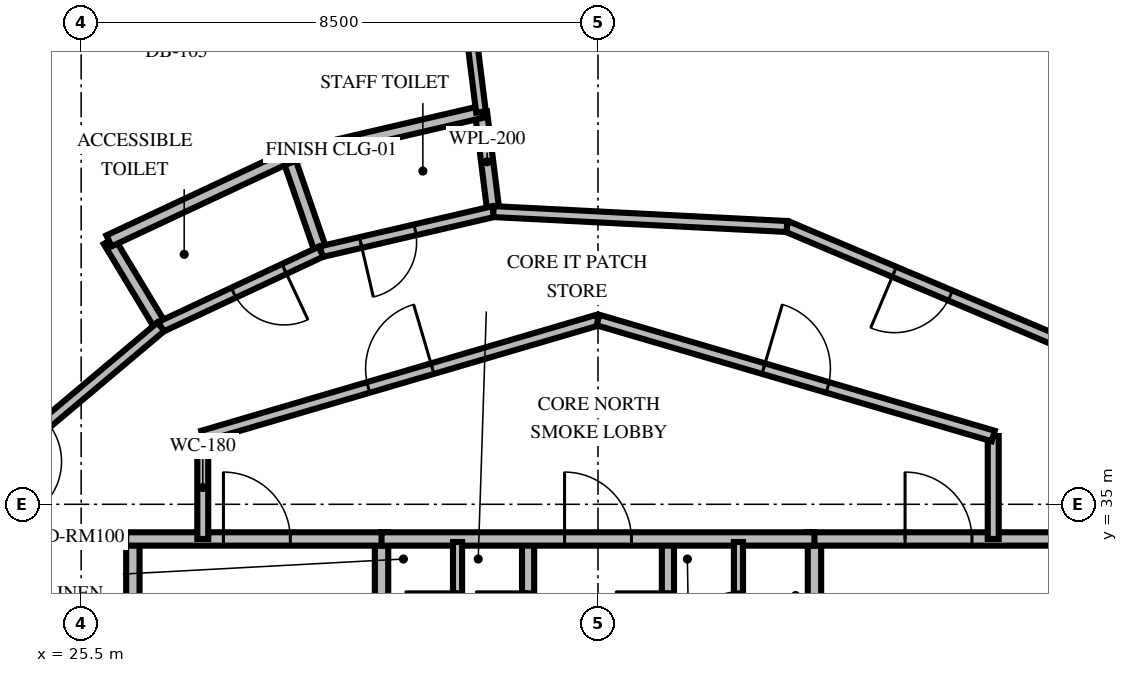
"""IFC4 building model, lengths in metres.
Left out: names, types, materials, properties, quantities, classifications, styles, units other than length and angle.
Written with IfcOpenShell. Run it as: python <this file> out.ifc"""

import sys

from ifc_helpers import new_model, si_unit, direction, frame, frame_2d, origin, place, context, subcontext, project, spatial, rectangle, extrude, element, fill, save


model = new_model("IFC4")
c1 = context("Model", 3, precision=1e-05, world=origin(), true_north=direction((0.0, 1.0)))
c2 = subcontext(c1, "Body", "Model", "MODEL_VIEW")
j1 = project(units=[si_unit("LENGTHUNIT", "METRE"), si_unit("PLANEANGLEUNIT", "RADIAN")], contexts=[c1])
p1 = place(None, origin())
s1 = spatial("IfcSite", under=j1, at=p1, CompositionType="ELEMENT")
p2 = place(p1, origin())
s2 = spatial("IfcBuilding", under=s1, at=p2, CompositionType="ELEMENT")
p3 = place(p2, frame((0.0, 0.0, 105.8)))
s3 = spatial("IfcBuildingStorey", under=s2, at=p3, CompositionType="ELEMENT", Elevation=105.8)
p4 = place(p3, frame((26.35, 30.05, 0.0), z_axis=(0.0, 0.0, 1.0), x_axis=(0.0, 1.0, 0.0)))
e1 = element("IfcWall", 1, at=p4, inside=s3, PredefinedType="SOLIDWALL", context=c2, shape_type="SweptSolid", body=[
    extrude(rectangle(XDim=4.38, YDim=0.22, at=frame_2d((2.19, 0.0))), origin(), (0.0, 0.0, 1.0), 2.8),
])
p5 = place(p3, frame((30.44, 30.05, 0.0), z_axis=(0.0, 0.0, 1.0), x_axis=(0.0, 1.0, 0.0)))
e2 = element("IfcWall", 2, at=p5, inside=s3, PredefinedType="SOLIDWALL", context=c2, shape_type="SweptSolid", body=[
    extrude(rectangle(XDim=4.38, YDim=0.22, at=frame_2d((2.19, 0.0))), origin(), (0.0, 0.0, 1.0), 2.8),
])
p6 = place(p5, frame((0.8, 0.0, 0.0)))
e3 = element("IfcOpeningElement", 3, at=p6, cuts=e2, PredefinedType="OPENING", context=c2, shape_type="SweptSolid", body=[
    extrude(rectangle(XDim=1.05, YDim=2.1, at=frame_2d((0.525, 1.05))), frame((0.0, 0.12, 0.0), z_axis=(0.0, -1.0, 0.0), x_axis=(1.0, 0.0, 0.0)), (0.0, 0.0, 1.0), 0.24),
])
p7 = place(p3, frame((26.24, 34.43, 0.0), z_axis=(0.0, 0.0, 1.0), x_axis=(1.0, 0.0, 0.0)))
e4 = element("IfcWall", 4, at=p7, inside=s3, PredefinedType="SOLIDWALL", context=c2, shape_type="SweptSolid", body=[
    extrude(rectangle(XDim=4.31, YDim=0.22, at=frame_2d((2.155, 0.0))), origin(), (0.0, 0.0, 1.0), 2.8),
])
p8 = place(p7, frame((1.6, 0.0, 0.0)))
e5 = element("IfcOpeningElement", 5, at=p8, cuts=e4, PredefinedType="OPENING", context=c2, shape_type="SweptSolid", body=[
    extrude(rectangle(XDim=1.1, YDim=2.15, at=frame_2d((0.55, 1.075))), frame((0.0, 0.12, 0.0), z_axis=(0.0, -1.0, 0.0), x_axis=(1.0, 0.0, 0.0)), (0.0, 0.0, 1.0), 0.24),
])
p9 = place(p3, frame((32.85, 30.05, 0.0), z_axis=(0.0, 0.0, 1.0), x_axis=(0.0, 1.0, 0.0)))
e6 = element("IfcWall", 6, at=p9, inside=s3, PredefinedType="SOLIDWALL", context=c2, shape_type="SweptSolid", body=[
    extrude(rectangle(XDim=4.38, YDim=0.2, at=frame_2d((2.19, 0.0))), origin(), (0.0, 0.0, 1.0), 2.8),
])
p10 = place(p9, frame((2.65, 0.0, 0.0)))
e7 = element("IfcOpeningElement", 7, at=p10, cuts=e6, PredefinedType="OPENING", context=c2, shape_type="SweptSolid", body=[
    extrude(rectangle(XDim=0.86, YDim=2.05, at=frame_2d((0.43, 1.025))), frame((0.0, 0.11, 0.0), z_axis=(0.0, -1.0, 0.0), x_axis=(1.0, 0.0, 0.0)), (0.0, 0.0, 1.0), 0.22),
])
p11 = place(p3, frame((37.56, 30.05, 0.0), z_axis=(0.0, 0.0, 1.0), x_axis=(0.0, 1.0, 0.0)))
e8 = element("IfcWall", 8, at=p11, inside=s3, PredefinedType="SOLIDWALL", context=c2, shape_type="SweptSolid", body=[
    extrude(rectangle(XDim=4.38, YDim=0.22, at=frame_2d((2.19, 0.0))), origin(), (0.0, 0.0, 1.0), 2.8),
])
p12 = place(p11, frame((0.8, 0.0, 0.0)))
e9 = element("IfcOpeningElement", 9, at=p12, cuts=e8, PredefinedType="OPENING", context=c2, shape_type="SweptSolid", body=[
    extrude(rectangle(XDim=1.05, YDim=2.1, at=frame_2d((0.525, 1.05))), frame((0.0, 0.12, 0.0), z_axis=(0.0, -1.0, 0.0), x_axis=(1.0, 0.0, 0.0)), (0.0, 0.0, 1.0), 0.24),
])
p13 = place(p3, frame((37.45, 34.43, 0.0), z_axis=(0.0, 0.0, 1.0), x_axis=(1.0, 0.0, 0.0)))
e10 = element("IfcWall", 10, at=p13, inside=s3, PredefinedType="SOLIDWALL", context=c2, shape_type="SweptSolid", body=[
    extrude(rectangle(XDim=4.31, YDim=0.22, at=frame_2d((2.155, 0.0))), origin(), (0.0, 0.0, 1.0), 2.8),
])
p14 = place(p13, frame((1.6, 0.0, 0.0)))
e11 = element("IfcOpeningElement", 11, at=p14, cuts=e10, PredefinedType="OPENING", context=c2, shape_type="SweptSolid", body=[
    extrude(rectangle(XDim=1.1, YDim=2.15, at=frame_2d((0.55, 1.075))), frame((0.0, 0.12, 0.0), z_axis=(0.0, -1.0, 0.0), x_axis=(1.0, 0.0, 0.0)), (0.0, 0.0, 1.0), 0.24),
])
p15 = place(p3, frame((35.15, 30.05, 0.0), z_axis=(0.0, 0.0, 1.0), x_axis=(0.0, 1.0, 0.0)))
e12 = element("IfcWall", 12, at=p15, inside=s3, PredefinedType="SOLIDWALL", context=c2, shape_type="SweptSolid", body=[
    extrude(rectangle(XDim=4.38, YDim=0.2, at=frame_2d((2.19, 0.0))), origin(), (0.0, 0.0, 1.0), 2.8),
])
p16 = place(p15, frame((2.65, 0.0, 0.0)))
e13 = element("IfcOpeningElement", 13, at=p16, cuts=e12, PredefinedType="OPENING", context=c2, shape_type="SweptSolid", body=[
    extrude(rectangle(XDim=0.86, YDim=2.05, at=frame_2d((0.43, 1.025))), frame((0.0, 0.11, 0.0), z_axis=(0.0, -1.0, 0.0), x_axis=(1.0, 0.0, 0.0)), (0.0, 0.0, 1.0), 0.22),
])
p17 = place(p3, frame((30.44, 34.43, 0.0), z_axis=(0.0, 0.0, 1.0), x_axis=(1.0, 0.0, 0.0)))
e14 = element("IfcWall", 14, at=p17, inside=s3, PredefinedType="SOLIDWALL", context=c2, shape_type="SweptSolid", body=[
    extrude(rectangle(XDim=7.12, YDim=0.22, at=frame_2d((3.56, 0.0))), origin(), (0.0, 0.0, 1.0), 2.8),
])
p18 = place(p17, frame((3.01, 0.0, 0.0)))
e15 = element("IfcOpeningElement", 15, at=p18, cuts=e14, PredefinedType="OPENING", context=c2, shape_type="SweptSolid", body=[
    extrude(rectangle(XDim=1.1, YDim=2.15, at=frame_2d((0.55, 1.075))), frame((0.0, 0.12, 0.0), z_axis=(0.0, -1.0, 0.0), x_axis=(1.0, 0.0, 0.0)), (0.0, 0.0, 1.0), 0.24),
])
p19 = place(p3, frame((31.69, 32.05, 0.0), z_axis=(0.0, 0.0, 1.0), x_axis=(0.0, 1.0, 0.0)))
e16 = element("IfcWall", 16, at=p19, inside=s3, PredefinedType="PARTITIONING", context=c2, shape_type="SweptSolid", body=[
    extrude(rectangle(XDim=2.33, YDim=0.15, at=frame_2d((1.165, 0.0))), origin(), (0.0, 0.0, 1.0), 2.8),
])
p20 = place(p19, frame((0.65, 0.0, 0.0)))
e17 = element("IfcOpeningElement", 17, at=p20, cuts=e16, PredefinedType="OPENING", context=c2, shape_type="SweptSolid", body=[
    extrude(rectangle(XDim=0.86, YDim=2.05, at=frame_2d((0.43, 1.025))), frame((0.0, 0.085, 0.0), z_axis=(0.0, -1.0, 0.0), x_axis=(1.0, 0.0, 0.0)), (0.0, 0.0, 1.0), 0.17),
])
p21 = place(p3, frame((36.31, 32.05, 0.0), z_axis=(0.0, 0.0, 1.0), x_axis=(0.0, 1.0, 0.0)))
e18 = element("IfcWall", 18, at=p21, inside=s3, PredefinedType="PARTITIONING", context=c2, shape_type="SweptSolid", body=[
    extrude(rectangle(XDim=2.33, YDim=0.15, at=frame_2d((1.165, 0.0))), origin(), (0.0, 0.0, 1.0), 2.8),
])
p22 = place(p21, frame((0.65, 0.0, 0.0)))
e19 = element("IfcOpeningElement", 19, at=p22, cuts=e18, PredefinedType="OPENING", context=c2, shape_type="SweptSolid", body=[
    extrude(rectangle(XDim=0.86, YDim=2.05, at=frame_2d((0.43, 1.025))), frame((0.0, 0.085, 0.0), z_axis=(0.0, -1.0, 0.0), x_axis=(1.0, 0.0, 0.0)), (0.0, 0.0, 1.0), 0.17),
])
for number, where, z_axis, x_axis in (
    (20, (27.5, 34.43, 0.0), (0.0, 0.0, 1.0), (0.0, 1.0, 0.0)),
    (21, (40.5, 36.123, 0.0), (0.0, 0.0, 1.0), (0.0, -1.0, 0.0)),
):
    element("IfcWall", number, at=place(p3, frame(where, z_axis=z_axis, x_axis=x_axis)), inside=s3, PredefinedType="PARTITIONING", context=c2, shape_type="SweptSolid", body=[
        extrude(rectangle(XDim=1.693, YDim=0.18, at=frame_2d((0.846, 0.0))), origin(), (0.0, 0.0, 1.0), 2.8),
    ])
p23 = place(p3, frame((27.5, 36.123, 0.0), z_axis=(0.0, 0.0, 1.0), x_axis=(0.959546654541, 0.281549671923, 0.0)))
e22 = element("IfcWall", 22, at=p23, inside=s3, PredefinedType="PARTITIONING", context=c2, shape_type="SweptSolid", body=[
    extrude(rectangle(XDim=6.774, YDim=0.18, at=frame_2d((3.387, 0.0))), origin(), (0.0, 0.0, 1.0), 2.8),
])
p24 = place(p23, frame((2.837, 0.0, 0.0)))
e23 = element("IfcOpeningElement", 23, at=p24, cuts=e22, PredefinedType="OPENING", context=c2, shape_type="SweptSolid", body=[
    extrude(rectangle(XDim=1.1, YDim=2.15, at=frame_2d((0.55, 1.075))), frame((0.0, 0.1, 0.0), z_axis=(0.0, -1.0, 0.0), x_axis=(1.0, 0.0, 0.0)), (0.0, 0.0, 1.0), 0.2),
])
p25 = place(p3, frame((34.0, 38.03, 0.0), z_axis=(0.0, 0.0, 1.0), x_axis=(0.959546654541, -0.281549671923, 0.0)))
e24 = element("IfcWall", 24, at=p25, inside=s3, PredefinedType="PARTITIONING", context=c2, shape_type="SweptSolid", body=[
    extrude(rectangle(XDim=6.774, YDim=0.18, at=frame_2d((3.387, 0.0))), origin(), (0.0, 0.0, 1.0), 2.8),
])
p26 = place(p25, frame((2.837, 0.0, 0.0)))
e25 = element("IfcOpeningElement", 25, at=p26, cuts=e24, PredefinedType="OPENING", context=c2, shape_type="SweptSolid", body=[
    extrude(rectangle(XDim=1.1, YDim=2.15, at=frame_2d((0.55, 1.075))), frame((0.0, 0.1, 0.0), z_axis=(0.0, -1.0, 0.0), x_axis=(1.0, 0.0, 0.0)), (0.0, 0.0, 1.0), 0.2),
])
p27 = place(p3, frame((32.28, 39.813, 0.0), z_axis=(0.0, 0.0, 1.0), x_axis=(-0.123688744547, 0.992321064209, 0.0)))
e26 = element("IfcWall", 26, at=p27, inside=s3, PredefinedType="PLUMBINGWALL", context=c2, shape_type="SweptSolid", body=[
    extrude(rectangle(XDim=1.65, YDim=0.2, at=frame_2d((0.825, 0.0))), origin(), (0.0, 0.0, 1.0), 2.8),
])
p28 = place(p3, frame((29.445, 39.154, 0.0), z_axis=(0.0, 0.0, 1.0), x_axis=(-0.327171551358, 0.944964960187, 0.0)))
e27 = element("IfcWall", 27, at=p28, inside=s3, PredefinedType="PLUMBINGWALL", context=c2, shape_type="SweptSolid", body=[
    extrude(rectangle(XDim=1.65, YDim=0.2, at=frame_2d((0.825, 0.0))), origin(), (0.0, 0.0, 1.0), 2.8),
])
p29 = place(p3, frame((32.075, 41.451, 0.0), z_axis=(0.0, 0.0, 1.0), x_axis=(-0.973971068417, -0.22667235801, 0.0)))
e28 = element("IfcWall", 28, at=p29, inside=s3, PredefinedType="PLUMBINGWALL", context=c2, shape_type="SweptSolid", body=[
    extrude(rectangle(XDim=3.255, YDim=0.2, at=frame_2d((1.627, 0.0))), origin(), (0.0, 0.0, 1.0), 2.8),
])
p30 = place(p3, frame((32.28, 39.813, 0.0), z_axis=(0.0, 0.0, 1.0), x_axis=(-0.97398951497, -0.22659308182, 0.0)))
e29 = element("IfcWall", 29, at=p30, inside=s3, PredefinedType="PARTITIONING", context=c2, shape_type="SweptSolid", body=[
    extrude(rectangle(XDim=2.91, YDim=0.18, at=frame_2d((1.455, 0.0))), origin(), (0.0, 0.0, 1.0), 2.8),
])
p31 = place(p30, frame((1.321, 0.0, 0.0)))
e30 = element("IfcOpeningElement", 30, at=p31, cuts=e29, PredefinedType="OPENING", context=c2, shape_type="SweptSolid", body=[
    extrude(rectangle(XDim=0.92, YDim=2.1, at=frame_2d((0.46, 1.05))), frame((0.0, 0.1, 0.0), z_axis=(0.0, -1.0, 0.0), x_axis=(1.0, 0.0, 0.0)), (0.0, 0.0, 1.0), 0.2),
])
p32 = place(p3, frame((26.81, 37.919, 0.0), z_axis=(0.0, 0.0, 1.0), x_axis=(-0.516539665959, 0.85626326179, 0.0)))
e31 = element("IfcWall", 31, at=p32, inside=s3, PredefinedType="PLUMBINGWALL", context=c2, shape_type="SweptSolid", body=[
    extrude(rectangle(XDim=1.65, YDim=0.2, at=frame_2d((0.825, 0.0))), origin(), (0.0, 0.0, 1.0), 2.8),
])
p33 = place(p3, frame((28.905, 40.713, 0.0), z_axis=(0.0, 0.0, 1.0), x_axis=(-0.905565194379, -0.424207117725, 0.0)))
e32 = element("IfcWall", 32, at=p33, inside=s3, PredefinedType="PLUMBINGWALL", context=c2, shape_type="SweptSolid", body=[
    extrude(rectangle(XDim=3.255, YDim=0.2, at=frame_2d((1.627, 0.0))), origin(), (0.0, 0.0, 1.0), 2.8),
])
p34 = place(p3, frame((29.445, 39.154, 0.0), z_axis=(0.0, 0.0, 1.0), x_axis=(-0.905545564417, -0.424249019757, 0.0)))
e33 = element("IfcWall", 33, at=p34, inside=s3, PredefinedType="PARTITIONING", context=c2, shape_type="SweptSolid", body=[
    extrude(rectangle(XDim=2.91, YDim=0.18, at=frame_2d((1.455, 0.0))), origin(), (0.0, 0.0, 1.0), 2.8),
])
p35 = place(p34, frame((0.669, 0.0, 0.0)))
e34 = element("IfcOpeningElement", 34, at=p35, cuts=e33, PredefinedType="OPENING", context=c2, shape_type="SweptSolid", body=[
    extrude(rectangle(XDim=0.92, YDim=2.1, at=frame_2d((0.46, 1.05))), frame((0.0, 0.1, 0.0), z_axis=(0.0, -1.0, 0.0), x_axis=(1.0, 0.0, 0.0)), (0.0, 0.0, 1.0), 0.2),
])
p36 = place(p3, frame((32.075, 41.451, 0.0), z_axis=(0.0, 0.0, 1.0), x_axis=(-0.123557239278, 0.992337446951, 0.0)))
e35 = element("IfcWall", 35, at=p36, inside=s3, PredefinedType="PARTITIONING", context=c2, shape_type="SweptSolid", body=[
    extrude(rectangle(XDim=4.153, YDim=0.16, at=frame_2d((2.077, 0.0))), origin(), (0.0, 0.0, 1.0), 2.8),
])
p37 = place(p3, frame((26.81, 37.919, 0.0), z_axis=(0.0, 0.0, 1.0), x_axis=(-0.764925735115, -0.644118482702, 0.0)))
e36 = element("IfcWall", 36, at=p37, inside=s3, PredefinedType="PARTITIONING", context=c2, shape_type="SweptSolid", body=[
    extrude(rectangle(XDim=4.355, YDim=0.18, at=frame_2d((2.177, 0.0))), origin(), (0.0, 0.0, 1.0), 2.8),
])
p38 = place(p37, frame((2.441, 0.0, 0.0)))
e37 = element("IfcOpeningElement", 37, at=p38, cuts=e36, PredefinedType="OPENING", context=c2, shape_type="SweptSolid", body=[
    extrude(rectangle(XDim=1.0, YDim=2.15, at=frame_2d((0.5, 1.075))), frame((0.0, 0.1, 0.0), z_axis=(0.0, -1.0, 0.0), x_axis=(1.0, 0.0, 0.0)), (0.0, 0.0, 1.0), 0.2),
])
p39 = place(p3, frame((41.561, 37.688, 0.0), z_axis=(0.0, 0.0, 1.0), x_axis=(-0.92119083755, 0.389111090583, 0.0)))
e38 = element("IfcWall", 38, at=p39, inside=s3, PredefinedType="PARTITIONING", context=c2, shape_type="SweptSolid", body=[
    extrude(rectangle(XDim=4.834, YDim=0.18, at=frame_2d((2.417, 0.0))), origin(), (0.0, 0.0, 1.0), 2.8),
])
p40 = place(p39, frame((1.917, 0.0, 0.0)))
e39 = element("IfcOpeningElement", 39, at=p40, cuts=e38, PredefinedType="OPENING", context=c2, shape_type="SweptSolid", body=[
    extrude(rectangle(XDim=1.0, YDim=2.15, at=frame_2d((0.5, 1.075))), frame((0.0, 0.1, 0.0), z_axis=(0.0, -1.0, 0.0), x_axis=(1.0, 0.0, 0.0)), (0.0, 0.0, 1.0), 0.2),
])
p41 = place(p3, frame((37.108, 39.569, 0.0), z_axis=(0.0, 0.0, 1.0), x_axis=(-0.998718869606, 0.050602564085, 0.0)))
e40 = element("IfcWall", 40, at=p41, inside=s3, PredefinedType="PARTITIONING", context=c2, shape_type="SweptSolid", body=[
    extrude(rectangle(XDim=4.834, YDim=0.18, at=frame_2d((2.417, 0.0))), origin(), (0.0, 0.0, 1.0), 2.8),
])
p42 = place(p8, origin())
e41 = element("IfcDoor", 41, at=p42, inside=s3, OperationType="SINGLE_SWING_LEFT", PredefinedType="DOOR", context=c2, shape_type="SweptSolid", body=[
    extrude(rectangle(XDim=1.1, YDim=2.15, at=frame_2d((0.55, 1.075))), frame((0.0, 0.025, 0.0), z_axis=(0.0, -1.0, 0.0), x_axis=(1.0, 0.0, 0.0)), (0.0, 0.0, 1.0), 0.05),
])
fill(e5, e41)
p43 = place(p10, origin())
e42 = element("IfcDoor", 42, at=p43, inside=s3, OperationType="SINGLE_SWING_RIGHT", PredefinedType="TRAPDOOR", context=c2, shape_type="SweptSolid", body=[
    extrude(rectangle(XDim=0.86, YDim=2.05, at=frame_2d((0.43, 1.025))), frame((0.0, 0.025, 0.0), z_axis=(0.0, -1.0, 0.0), x_axis=(1.0, 0.0, 0.0)), (0.0, 0.0, 1.0), 0.05),
])
fill(e7, e42)
p44 = place(p14, origin())
e43 = element("IfcDoor", 43, at=p44, inside=s3, OperationType="SINGLE_SWING_LEFT", PredefinedType="DOOR", context=c2, shape_type="SweptSolid", body=[
    extrude(rectangle(XDim=1.1, YDim=2.15, at=frame_2d((0.55, 1.075))), frame((0.0, 0.025, 0.0), z_axis=(0.0, -1.0, 0.0), x_axis=(1.0, 0.0, 0.0)), (0.0, 0.0, 1.0), 0.05),
])
fill(e11, e43)
p45 = place(p16, origin())
e44 = element("IfcDoor", 44, at=p45, inside=s3, OperationType="SINGLE_SWING_RIGHT", PredefinedType="TRAPDOOR", context=c2, shape_type="SweptSolid", body=[
    extrude(rectangle(XDim=0.86, YDim=2.05, at=frame_2d((0.43, 1.025))), frame((0.0, 0.025, 0.0), z_axis=(0.0, -1.0, 0.0), x_axis=(1.0, 0.0, 0.0)), (0.0, 0.0, 1.0), 0.05),
])
fill(e13, e44)
p46 = place(p18, origin())
e45 = element("IfcDoor", 45, at=p46, inside=s3, OperationType="SINGLE_SWING_LEFT", PredefinedType="DOOR", context=c2, shape_type="SweptSolid", body=[
    extrude(rectangle(XDim=1.1, YDim=2.15, at=frame_2d((0.55, 1.075))), frame((0.0, 0.025, 0.0), z_axis=(0.0, -1.0, 0.0), x_axis=(1.0, 0.0, 0.0)), (0.0, 0.0, 1.0), 0.05),
])
fill(e15, e45)
p47 = place(p20, origin())
e46 = element("IfcDoor", 46, at=p47, inside=s3, OperationType="SINGLE_SWING_RIGHT", PredefinedType="TRAPDOOR", context=c2, shape_type="SweptSolid", body=[
    extrude(rectangle(XDim=0.86, YDim=2.05, at=frame_2d((0.43, 1.025))), frame((0.0, 0.025, 0.0), z_axis=(0.0, -1.0, 0.0), x_axis=(1.0, 0.0, 0.0)), (0.0, 0.0, 1.0), 0.05),
])
fill(e17, e46)
p48 = place(p22, origin())
e47 = element("IfcDoor", 47, at=p48, inside=s3, OperationType="SINGLE_SWING_LEFT", PredefinedType="TRAPDOOR", context=c2, shape_type="SweptSolid", body=[
    extrude(rectangle(XDim=0.86, YDim=2.05, at=frame_2d((0.43, 1.025))), frame((0.0, 0.025, 0.0), z_axis=(0.0, -1.0, 0.0), x_axis=(1.0, 0.0, 0.0)), (0.0, 0.0, 1.0), 0.05),
])
fill(e19, e47)
p49 = place(p24, origin())
e48 = element("IfcDoor", 48, at=p49, inside=s3, OperationType="SINGLE_SWING_RIGHT", PredefinedType="DOOR", context=c2, shape_type="SweptSolid", body=[
    extrude(rectangle(XDim=1.1, YDim=2.15, at=frame_2d((0.55, 1.075))), frame((0.0, 0.025, 0.0), z_axis=(0.0, -1.0, 0.0), x_axis=(1.0, 0.0, 0.0)), (0.0, 0.0, 1.0), 0.05),
])
fill(e23, e48)
p50 = place(p26, origin())
e49 = element("IfcDoor", 49, at=p50, inside=s3, OperationType="SINGLE_SWING_LEFT", PredefinedType="DOOR", context=c2, shape_type="SweptSolid", body=[
    extrude(rectangle(XDim=1.1, YDim=2.15, at=frame_2d((0.55, 1.075))), frame((0.0, 0.025, 0.0), z_axis=(0.0, -1.0, 0.0), x_axis=(1.0, 0.0, 0.0)), (0.0, 0.0, 1.0), 0.05),
])
fill(e25, e49)
p51 = place(p31, origin())
e50 = element("IfcDoor", 50, at=p51, inside=s3, OperationType="SINGLE_SWING_RIGHT", PredefinedType="DOOR", context=c2, shape_type="SweptSolid", body=[
    extrude(rectangle(XDim=0.92, YDim=2.1, at=frame_2d((0.46, 1.05))), frame((0.0, 0.025, 0.0), z_axis=(0.0, -1.0, 0.0), x_axis=(1.0, 0.0, 0.0)), (0.0, 0.0, 1.0), 0.05),
])
fill(e30, e50)
p52 = place(p35, origin())
e51 = element("IfcDoor", 51, at=p52, inside=s3, OperationType="SINGLE_SWING_LEFT", PredefinedType="DOOR", context=c2, shape_type="SweptSolid", body=[
    extrude(rectangle(XDim=0.92, YDim=2.1, at=frame_2d((0.46, 1.05))), frame((0.0, 0.025, 0.0), z_axis=(0.0, -1.0, 0.0), x_axis=(1.0, 0.0, 0.0)), (0.0, 0.0, 1.0), 0.05),
])
fill(e34, e51)
p53 = place(p40, origin())
e52 = element("IfcDoor", 52, at=p53, inside=s3, OperationType="SINGLE_SWING_RIGHT", PredefinedType="DOOR", context=c2, shape_type="SweptSolid", body=[
    extrude(rectangle(XDim=1.0, YDim=2.15, at=frame_2d((0.5, 1.075))), frame((0.0, 0.025, 0.0), z_axis=(0.0, -1.0, 0.0), x_axis=(1.0, 0.0, 0.0)), (0.0, 0.0, 1.0), 0.05),
])
fill(e39, e52)
save(model, sys.argv[1])
